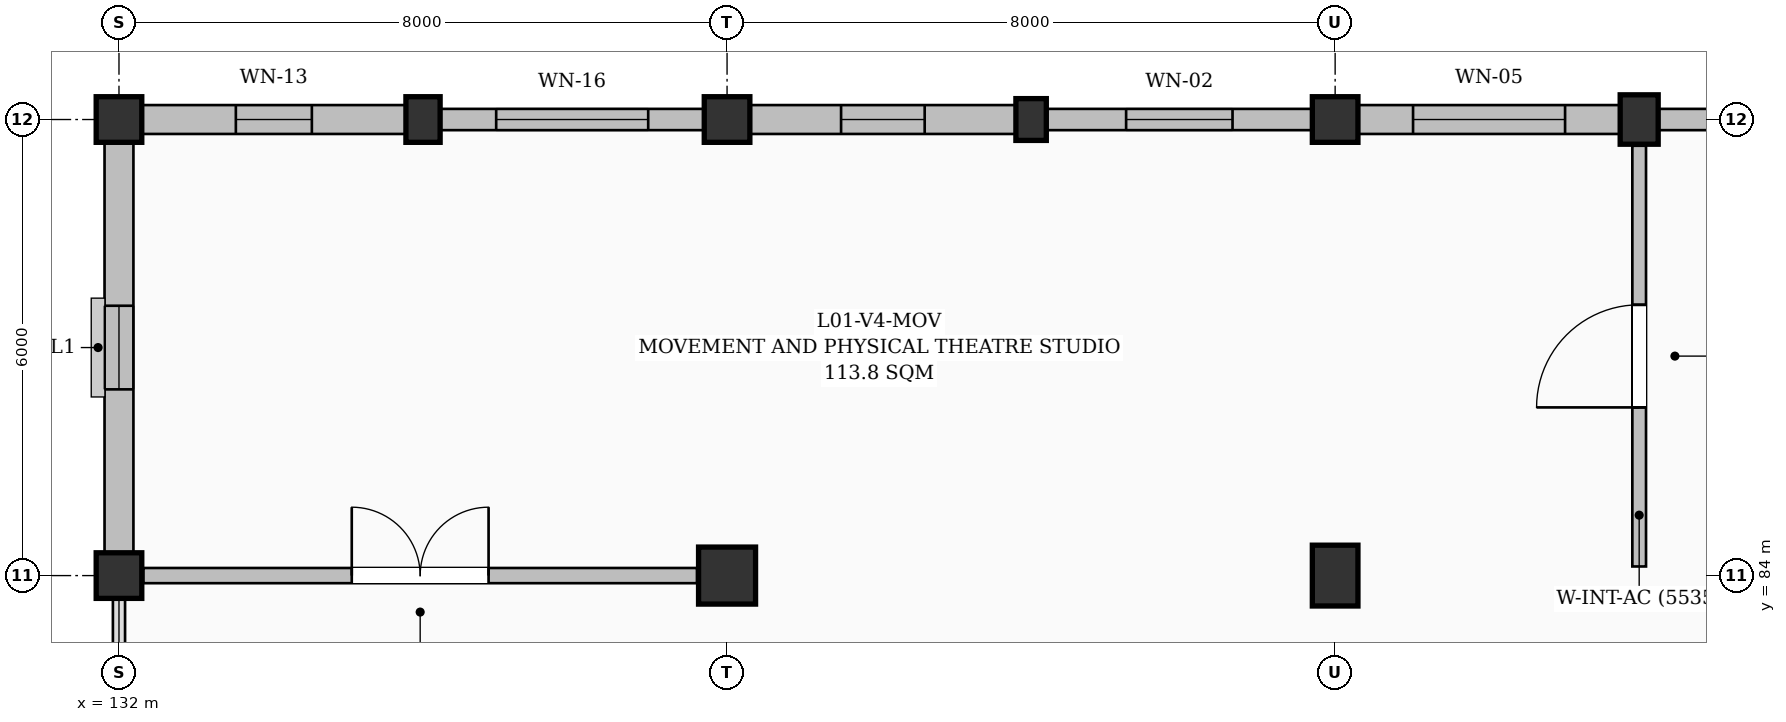
"""IFC4 building model, lengths in metres.
Left out: names, types, materials, properties, quantities, classifications, styles, units other than length and angle.
Written with IfcOpenShell. Run it as: python <this file> out.ifc"""

import sys

from ifc_helpers import new_model, si_unit, direction, frame, frame_2d, origin, origin_2d, place, context, subcontext, project, spatial, rectangle, extrude, element, fill, save


model = new_model("IFC4")
c1 = context("Model", 3, precision=1e-05, world=origin(), true_north=direction((0.0, 1.0)))
c2 = subcontext(c1, "Body", "Model", "MODEL_VIEW")
j1 = project(units=[si_unit("LENGTHUNIT", "METRE"), si_unit("PLANEANGLEUNIT", "RADIAN")], contexts=[c1])
p1 = place(None, origin())
s1 = spatial("IfcSite", under=j1, at=p1, CompositionType="ELEMENT")
p2 = place(p1, origin())
s2 = spatial("IfcBuilding", under=s1, at=p2, CompositionType="ELEMENT")
p3 = place(p2, frame((0.0, 0.0, 4.8)))
s3 = spatial("IfcBuildingStorey", under=s2, at=p3, CompositionType="ELEMENT", Elevation=4.8)
for number, where, z_axis, x_axis in (
    (1, (132.0, 84.0, 0.0), (0.0, 0.0, 1.0), (1.0, 0.0, 0.0)),
    (2, (132.0, 90.0, 0.0), (0.0, 0.0, 1.0), (1.0, 0.0, 0.0)),
):
    element("IfcColumn", number, at=place(p3, frame(where, z_axis=z_axis, x_axis=x_axis)), inside=s3, PredefinedType="COLUMN", context=c2, shape_type="SweptSolid", body=[
        extrude(rectangle(XDim=0.6, YDim=0.6, at=origin_2d()), origin(), (0.0, 0.0, 1.0), 4.5),
    ])
p4 = place(p3, frame((136.0, 90.0, 0.0), z_axis=(0.0, 0.0, 1.0), x_axis=(1.0, 0.0, 0.0)))
e3 = element("IfcColumn", 3, at=p4, inside=s3, PredefinedType="PILASTER", context=c2, shape_type="SweptSolid", body=[
    extrude(rectangle(XDim=0.45, YDim=0.6, at=origin_2d()), origin(), (0.0, 0.0, 1.0), 4.5),
])
p5 = place(p3, frame((140.0, 84.0, 0.0), z_axis=(0.0, 0.0, 1.0), x_axis=(1.0, 0.0, 0.0)))
e4 = element("IfcColumn", 4, at=p5, inside=s3, PredefinedType="COLUMN", context=c2, shape_type="SweptSolid", body=[
    extrude(rectangle(XDim=0.75, YDim=0.75, at=origin_2d()), origin(), (0.0, 0.0, 1.0), 4.5),
])
p6 = place(p3, frame((140.0, 90.0, 0.0), z_axis=(0.0, 0.0, 1.0), x_axis=(1.0, 0.0, 0.0)))
e5 = element("IfcColumn", 5, at=p6, inside=s3, PredefinedType="COLUMN", context=c2, shape_type="SweptSolid", body=[
    extrude(rectangle(XDim=0.6, YDim=0.6, at=origin_2d()), origin(), (0.0, 0.0, 1.0), 4.5),
])
p7 = place(p3, frame((144.0, 90.0, 0.0), z_axis=(0.0, 0.0, 1.0), x_axis=(1.0, 0.0, 0.0)))
e6 = element("IfcColumn", 6, at=p7, inside=s3, PredefinedType="PILASTER", context=c2, shape_type="SweptSolid", body=[
    extrude(rectangle(XDim=0.4, YDim=0.55, at=origin_2d()), origin(), (0.0, 0.0, 1.0), 4.5),
])
p8 = place(p3, frame((148.0, 84.0, 0.0), z_axis=(0.0, 0.0, 1.0), x_axis=(1.0, 0.0, 0.0)))
e7 = element("IfcColumn", 7, at=p8, inside=s3, PredefinedType="COLUMN", context=c2, shape_type="SweptSolid", body=[
    extrude(rectangle(XDim=0.6, YDim=0.8, at=origin_2d()), origin(), (0.0, 0.0, 1.0), 4.5),
])
p9 = place(p3, frame((148.0, 90.0, 0.0), z_axis=(0.0, 0.0, 1.0), x_axis=(1.0, 0.0, 0.0)))
e8 = element("IfcColumn", 8, at=p9, inside=s3, PredefinedType="COLUMN", context=c2, shape_type="SweptSolid", body=[
    extrude(rectangle(XDim=0.6, YDim=0.6, at=origin_2d()), origin(), (0.0, 0.0, 1.0), 4.5),
])
p10 = place(p3, frame((152.0, 90.0, 0.0), z_axis=(0.0, 0.0, 1.0), x_axis=(1.0, 0.0, 0.0)))
e9 = element("IfcColumn", 9, at=p10, inside=s3, PredefinedType="PILASTER", context=c2, shape_type="SweptSolid", body=[
    extrude(rectangle(XDim=0.5, YDim=0.65, at=origin_2d()), origin(), (0.0, 0.0, 1.0), 4.5),
])
p11 = place(p3, frame((132.0, 84.3, 0.0), z_axis=(0.0, 0.0, 1.0), x_axis=(0.0, 1.0, 0.0)))
e10 = element("IfcWall", 10, at=p11, inside=s3, PredefinedType="SOLIDWALL", context=c2, shape_type="SweptSolid", body=[
    extrude(rectangle(XDim=5.4, YDim=0.38, at=frame_2d((2.7, 0.0))), origin(), (0.0, 0.0, 1.0), 3.635),
])
p12 = place(p11, frame((2.15, 0.0, 0.95)))
e11 = element("IfcOpeningElement", 11, at=p12, cuts=e10, PredefinedType="OPENING", context=c2, shape_type="SweptSolid", body=[
    extrude(rectangle(XDim=1.1, YDim=2.0, at=frame_2d((0.55, 1.0))), frame((0.0, 0.2, 0.0), z_axis=(0.0, -1.0, 0.0), x_axis=(1.0, 0.0, 0.0)), (0.0, 0.0, 1.0), 0.4),
])
p13 = place(p3, frame((132.3, 90.0, 0.0), z_axis=(0.0, 0.0, 1.0), x_axis=(1.0, 0.0, 0.0)))
e12 = element("IfcWall", 12, at=p13, inside=s3, PredefinedType="SOLIDWALL", context=c2, shape_type="SweptSolid", body=[
    extrude(rectangle(XDim=3.475, YDim=0.38, at=frame_2d((1.737, 0.0))), origin(), (0.0, 0.0, 1.0), 3.635),
])
p14 = place(p13, frame((1.238, 0.0, 0.95)))
e13 = element("IfcOpeningElement", 13, at=p14, cuts=e12, PredefinedType="OPENING", context=c2, shape_type="SweptSolid", body=[
    extrude(rectangle(XDim=1.0, YDim=1.4, at=frame_2d((0.5, 0.7))), frame((0.0, 0.2, 0.0), z_axis=(0.0, -1.0, 0.0), x_axis=(1.0, 0.0, 0.0)), (0.0, 0.0, 1.0), 0.4),
])
p15 = place(p3, frame((136.225, 90.0, 0.0), z_axis=(0.0, 0.0, 1.0), x_axis=(1.0, 0.0, 0.0)))
e14 = element("IfcWall", 14, at=p15, inside=s3, PredefinedType="SOLIDWALL", context=c2, shape_type="SweptSolid", body=[
    extrude(rectangle(XDim=3.475, YDim=0.28, at=frame_2d((1.737, 0.0))), origin(), (0.0, 0.0, 1.0), 3.635),
])
p16 = place(p15, frame((0.738, 0.0, 0.95)))
e15 = element("IfcOpeningElement", 15, at=p16, cuts=e14, PredefinedType="OPENING", context=c2, shape_type="SweptSolid", body=[
    extrude(rectangle(XDim=2.0, YDim=1.2, at=frame_2d((1.0, 0.6))), frame((0.0, 0.15, 0.0), z_axis=(0.0, -1.0, 0.0), x_axis=(1.0, 0.0, 0.0)), (0.0, 0.0, 1.0), 0.3),
])
p17 = place(p3, frame((140.3, 90.0, 0.0), z_axis=(0.0, 0.0, 1.0), x_axis=(1.0, 0.0, 0.0)))
e16 = element("IfcWall", 16, at=p17, inside=s3, PredefinedType="SOLIDWALL", context=c2, shape_type="SweptSolid", body=[
    extrude(rectangle(XDim=3.5, YDim=0.38, at=frame_2d((1.75, 0.0))), origin(), (0.0, 0.0, 1.0), 3.935),
])
p18 = place(p17, frame((1.2, 0.0, 0.95)))
e17 = element("IfcOpeningElement", 17, at=p18, cuts=e16, PredefinedType="OPENING", context=c2, shape_type="SweptSolid", body=[
    extrude(rectangle(XDim=1.1, YDim=2.0, at=frame_2d((0.55, 1.0))), frame((0.0, 0.2, 0.0), z_axis=(0.0, -1.0, 0.0), x_axis=(1.0, 0.0, 0.0)), (0.0, 0.0, 1.0), 0.4),
])
p19 = place(p3, frame((144.2, 90.0, 0.0), z_axis=(0.0, 0.0, 1.0), x_axis=(1.0, 0.0, 0.0)))
e18 = element("IfcWall", 18, at=p19, inside=s3, PredefinedType="SOLIDWALL", context=c2, shape_type="SweptSolid", body=[
    extrude(rectangle(XDim=3.5, YDim=0.28, at=frame_2d((1.75, 0.0))), origin(), (0.0, 0.0, 1.0), 3.935),
])
p20 = place(p19, frame((1.05, 0.0, 0.95)))
e19 = element("IfcOpeningElement", 19, at=p20, cuts=e18, PredefinedType="OPENING", context=c2, shape_type="SweptSolid", body=[
    extrude(rectangle(XDim=1.4, YDim=1.8, at=frame_2d((0.7, 0.9))), frame((0.0, 0.15, 0.0), z_axis=(0.0, -1.0, 0.0), x_axis=(1.0, 0.0, 0.0)), (0.0, 0.0, 1.0), 0.3),
])
p21 = place(p3, frame((148.3, 90.0, 0.0), z_axis=(0.0, 0.0, 1.0), x_axis=(1.0, 0.0, 0.0)))
e20 = element("IfcWall", 20, at=p21, inside=s3, PredefinedType="SOLIDWALL", context=c2, shape_type="SweptSolid", body=[
    extrude(rectangle(XDim=3.45, YDim=0.38, at=frame_2d((1.725, 0.0))), origin(), (0.0, 0.0, 1.0), 3.735),
])
p22 = place(p21, frame((0.725, 0.0, 0.95)))
e21 = element("IfcOpeningElement", 21, at=p22, cuts=e20, PredefinedType="OPENING", context=c2, shape_type="SweptSolid", body=[
    extrude(rectangle(XDim=2.0, YDim=1.8, at=frame_2d((1.0, 0.9))), frame((0.0, 0.2, 0.0), z_axis=(0.0, -1.0, 0.0), x_axis=(1.0, 0.0, 0.0)), (0.0, 0.0, 1.0), 0.4),
])
p23 = place(p3, frame((152.25, 90.0, 0.0), z_axis=(0.0, 0.0, 1.0), x_axis=(1.0, 0.0, 0.0)))
e22 = element("IfcWall", 22, at=p23, inside=s3, PredefinedType="SOLIDWALL", context=c2, shape_type="SweptSolid", body=[
    extrude(rectangle(XDim=3.45, YDim=0.28, at=frame_2d((1.725, 0.0))), origin(), (0.0, 0.0, 1.0), 3.735),
])
p24 = place(p23, frame((1.125, 0.0, 0.95)))
e23 = element("IfcOpeningElement", 23, at=p24, cuts=e22, PredefinedType="OPENING", context=c2, shape_type="SweptSolid", body=[
    extrude(rectangle(XDim=1.2, YDim=1.5, at=frame_2d((0.6, 0.75))), frame((0.0, 0.15, 0.0), z_axis=(0.0, -1.0, 0.0), x_axis=(1.0, 0.0, 0.0)), (0.0, 0.0, 1.0), 0.3),
])
p25 = place(p3, frame((132.32, 84.0, 0.0), z_axis=(0.0, 0.0, 1.0), x_axis=(1.0, 0.0, 0.0)))
e24 = element("IfcWall", 24, at=p25, inside=s3, PredefinedType="PARTITIONING", context=c2, shape_type="SweptSolid", body=[
    extrude(rectangle(XDim=7.285, YDim=0.2, at=frame_2d((3.643, 0.0))), origin(), (0.0, 0.0, 1.0), 3.945),
])
p26 = place(p25, frame((2.742, 0.0, 0.0)))
e25 = element("IfcOpeningElement", 25, at=p26, cuts=e24, PredefinedType="OPENING", context=c2, shape_type="SweptSolid", body=[
    extrude(rectangle(XDim=1.8, YDim=2.35, at=frame_2d((0.9, 1.175))), frame((0.0, 0.11, 0.0), z_axis=(0.0, -1.0, 0.0), x_axis=(1.0, 0.0, 0.0)), (0.0, 0.0, 1.0), 0.22),
])
p27 = place(p3, frame((152.0, 84.12, 0.0), z_axis=(0.0, 0.0, 1.0), x_axis=(0.0, 1.0, 0.0)))
e26 = element("IfcWall", 26, at=p27, inside=s3, PredefinedType="PARTITIONING", context=c2, shape_type="SweptSolid", body=[
    extrude(rectangle(XDim=5.535, YDim=0.18, at=frame_2d((2.768, 0.0))), origin(), (0.0, 0.0, 1.0), 4.25),
])
p28 = place(p27, frame((2.093, 0.0, 0.0)))
e27 = element("IfcOpeningElement", 27, at=p28, cuts=e26, PredefinedType="OPENING", context=c2, shape_type="SweptSolid", body=[
    extrude(rectangle(XDim=1.35, YDim=2.2, at=frame_2d((0.675, 1.1))), frame((0.0, 0.1, 0.0), z_axis=(0.0, -1.0, 0.0), x_axis=(1.0, 0.0, 0.0)), (0.0, 0.0, 1.0), 0.2),
])
p29 = place(p12, origin())
e28 = element("IfcWindow", 28, at=p29, inside=s3, PartitioningType="SINGLE_PANEL", PredefinedType="WINDOW", context=c2, shape_type="SweptSolid", body=[
    extrude(rectangle(XDim=1.1, YDim=2.0, at=frame_2d((0.55, 1.0))), frame((0.0, 0.03, 0.0), z_axis=(0.0, -1.0, 0.0), x_axis=(1.0, 0.0, 0.0)), (0.0, 0.0, 1.0), 0.06),
])
fill(e11, e28)
p30 = place(p14, origin())
e29 = element("IfcWindow", 29, at=p30, inside=s3, PartitioningType="SINGLE_PANEL", PredefinedType="WINDOW", context=c2, shape_type="SweptSolid", body=[
    extrude(rectangle(XDim=1.0, YDim=1.4, at=frame_2d((0.5, 0.7))), frame((0.0, 0.03, 0.0), z_axis=(0.0, -1.0, 0.0), x_axis=(1.0, 0.0, 0.0)), (0.0, 0.0, 1.0), 0.06),
])
fill(e13, e29)
p31 = place(p16, origin())
e30 = element("IfcWindow", 30, at=p31, inside=s3, PartitioningType="DOUBLE_PANEL_HORIZONTAL", PredefinedType="WINDOW", context=c2, shape_type="SweptSolid", body=[
    extrude(rectangle(XDim=2.0, YDim=1.2, at=frame_2d((1.0, 0.6))), frame((0.0, 0.03, 0.0), z_axis=(0.0, -1.0, 0.0), x_axis=(1.0, 0.0, 0.0)), (0.0, 0.0, 1.0), 0.06),
])
fill(e15, e30)
p32 = place(p18, origin())
e31 = element("IfcWindow", 31, at=p32, inside=s3, PartitioningType="SINGLE_PANEL", PredefinedType="WINDOW", context=c2, shape_type="SweptSolid", body=[
    extrude(rectangle(XDim=1.1, YDim=2.0, at=frame_2d((0.55, 1.0))), frame((0.0, 0.03, 0.0), z_axis=(0.0, -1.0, 0.0), x_axis=(1.0, 0.0, 0.0)), (0.0, 0.0, 1.0), 0.06),
])
fill(e17, e31)
p33 = place(p20, origin())
e32 = element("IfcWindow", 32, at=p33, inside=s3, PartitioningType="DOUBLE_PANEL_VERTICAL", PredefinedType="WINDOW", context=c2, shape_type="SweptSolid", body=[
    extrude(rectangle(XDim=1.4, YDim=1.8, at=frame_2d((0.7, 0.9))), frame((0.0, 0.03, 0.0), z_axis=(0.0, -1.0, 0.0), x_axis=(1.0, 0.0, 0.0)), (0.0, 0.0, 1.0), 0.06),
])
fill(e19, e32)
p34 = place(p22, origin())
e33 = element("IfcWindow", 33, at=p34, inside=s3, PartitioningType="TRIPLE_PANEL_VERTICAL", PredefinedType="WINDOW", context=c2, shape_type="SweptSolid", body=[
    extrude(rectangle(XDim=2.0, YDim=1.8, at=frame_2d((1.0, 0.9))), frame((0.0, 0.03, 0.0), z_axis=(0.0, -1.0, 0.0), x_axis=(1.0, 0.0, 0.0)), (0.0, 0.0, 1.0), 0.06),
])
fill(e21, e33)
p35 = place(p26, origin())
e34 = element("IfcDoor", 34, at=p35, inside=s3, OperationType="DOUBLE_DOOR_SINGLE_SWING", PredefinedType="DOOR", context=c2, shape_type="SweptSolid", body=[
    extrude(rectangle(XDim=1.8, YDim=2.35, at=frame_2d((0.9, 1.175))), frame((0.0, 0.025, 0.0), z_axis=(0.0, -1.0, 0.0), x_axis=(1.0, 0.0, 0.0)), (0.0, 0.0, 1.0), 0.05),
])
fill(e25, e34)
p36 = place(p28, origin())
e35 = element("IfcDoor", 35, at=p36, inside=s3, OperationType="SINGLE_SWING_LEFT", PredefinedType="DOOR", context=c2, shape_type="SweptSolid", body=[
    extrude(rectangle(XDim=1.35, YDim=2.2, at=frame_2d((0.675, 1.1))), frame((0.0, 0.025, 0.0), z_axis=(0.0, -1.0, 0.0), x_axis=(1.0, 0.0, 0.0)), (0.0, 0.0, 1.0), 0.05),
])
fill(e27, e35)
save(model, sys.argv[1])
